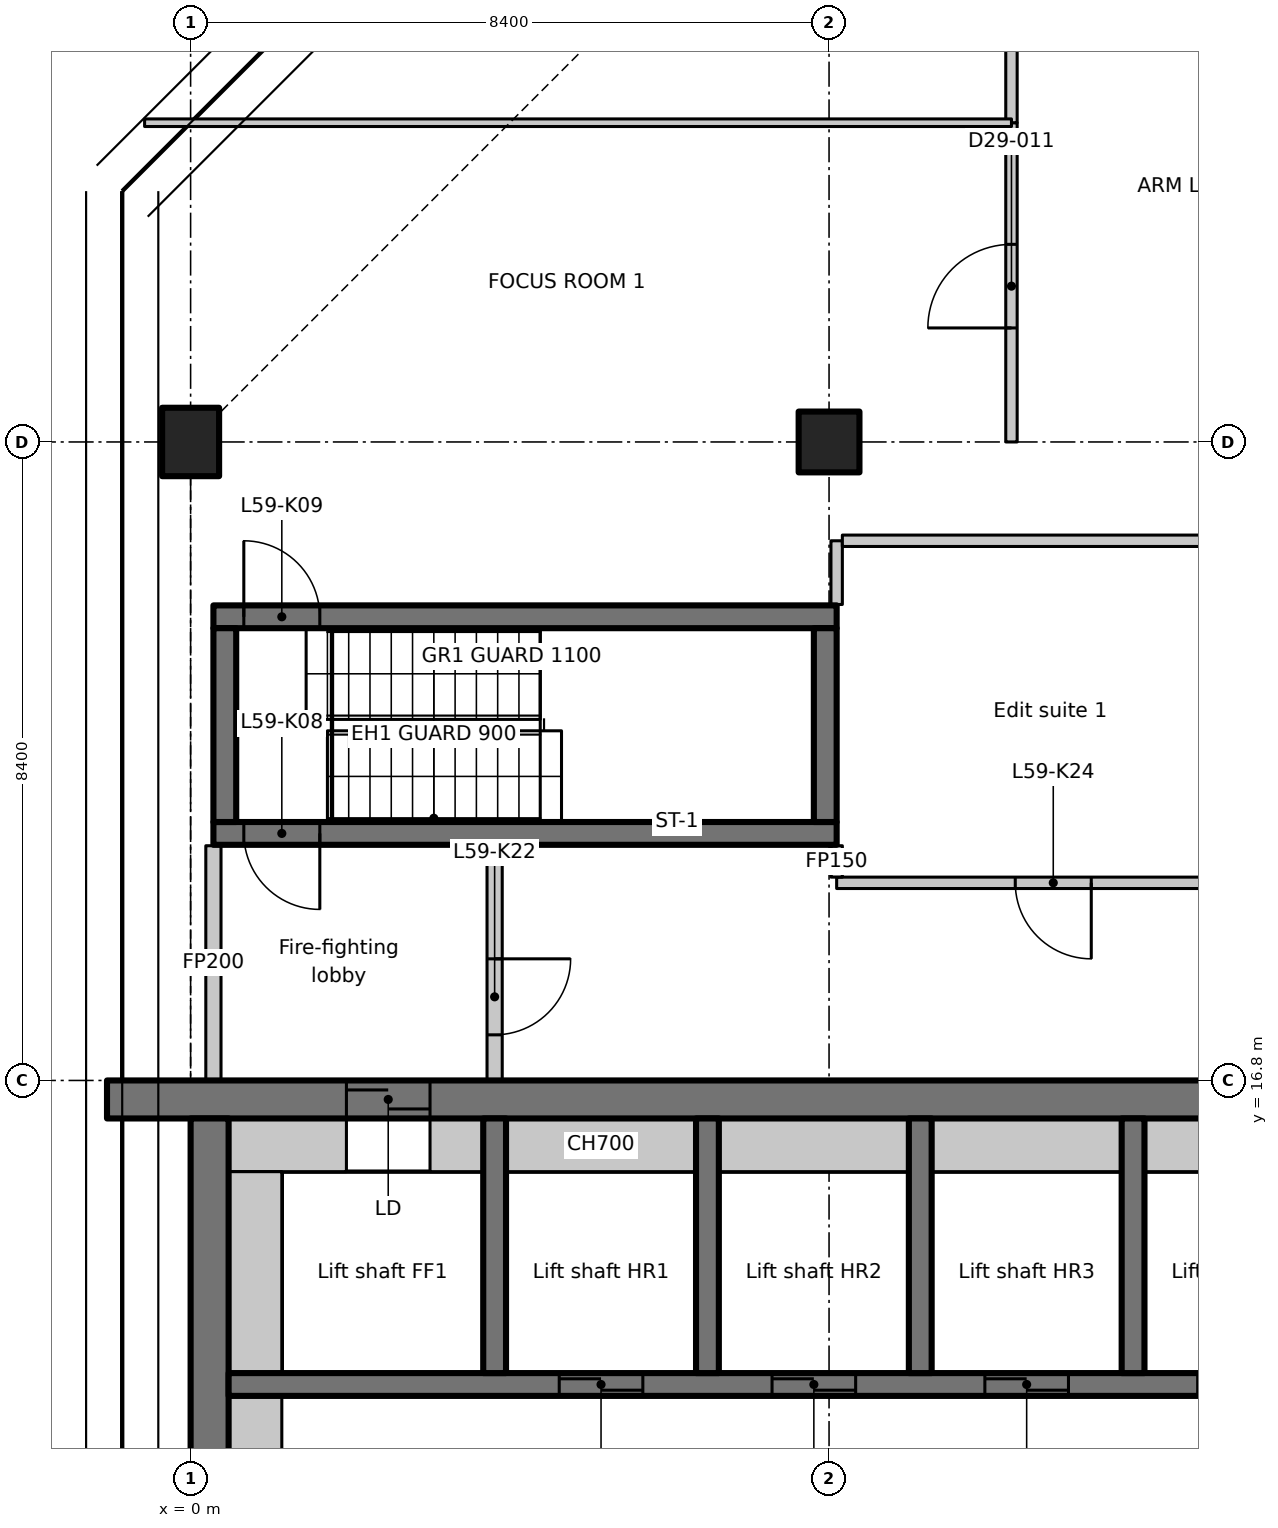
"""IFC4 building model, lengths in metres.
Left out: names, types, materials, properties, quantities, classifications, styles, units other than length and angle.
Written with IfcOpenShell. Run it as: python <this file> out.ifc"""

import sys

from ifc_helpers import new_model, si_unit, direction, frame, frame_2d, origin, origin_2d, place, context, subcontext, project, spatial, polyline, rectangle, outline, extrude, element, fill, save


model = new_model("IFC4")
c1 = context("Model", 3, precision=1e-05, world=origin(), true_north=direction((0.0, 1.0)))
c2 = subcontext(c1, "Body", "Model", "MODEL_VIEW")
j1 = project(units=[si_unit("LENGTHUNIT", "METRE"), si_unit("PLANEANGLEUNIT", "RADIAN")], contexts=[c1])
p1 = place(None, origin())
s1 = spatial("IfcSite", under=j1, at=p1, CompositionType="ELEMENT")
p2 = place(p1, origin())
s2 = spatial("IfcBuilding", under=s1, at=p2, CompositionType="ELEMENT")
p3 = place(p2, frame((0.0, 0.0, 233.7)))
s3 = spatial("IfcBuildingStorey", under=s2, at=p3, CompositionType="ELEMENT", Elevation=233.7)
p4 = place(p3, frame((0.0, 25.2, 0.0), z_axis=(0.0, 0.0, 1.0), x_axis=(1.0, 0.0, 0.0)))
e1 = element("IfcColumn", 1, at=p4, inside=s3, PredefinedType="COLUMN", context=c2, shape_type="SweptSolid", body=[
    extrude(rectangle(XDim=0.75, YDim=0.9, at=origin_2d()), origin(), (0.0, 0.0, 1.0), 3.35),
])
p5 = place(p3, frame((8.4, 25.2, 0.0), z_axis=(0.0, 0.0, 1.0), x_axis=(1.0, 0.0, 0.0)))
e2 = element("IfcColumn", 2, at=p5, inside=s3, PredefinedType="COLUMN", context=c2, shape_type="SweptSolid", body=[
    extrude(rectangle(XDim=0.8, YDim=0.8, at=origin_2d()), origin(), (0.0, 0.0, 1.0), 3.35),
])
p6 = place(p3, frame((-1.1, 16.55, 0.0), z_axis=(0.0, 0.0, 1.0), x_axis=(1.0, 0.0, 0.0)))
e3 = element("IfcWall", 3, at=p6, inside=s3, PredefinedType="SHEAR", context=c2, shape_type="SweptSolid", body=[
    extrude(rectangle(XDim=22.1, YDim=0.5, at=frame_2d((11.05, 0.0))), origin(), (0.0, 0.0, 1.0), 3.35),
])
p7 = place(p6, frame((3.15, 0.0, 0.0)))
e4 = element("IfcOpeningElement", 4, at=p7, cuts=e3, PredefinedType="OPENING", context=c2, shape_type="SweptSolid", body=[
    extrude(rectangle(XDim=1.1, YDim=2.3, at=frame_2d((0.55, 1.15))), frame((0.0, 0.26, 0.0), z_axis=(0.0, -1.0, 0.0), x_axis=(1.0, 0.0, 0.0)), (0.0, 0.0, 1.0), 0.52),
])
p8 = place(p3, frame((0.25, 7.436, 0.0), z_axis=(0.0, 0.0, 1.0), x_axis=(0.0, 1.0, 0.0)))
e5 = element("IfcWall", 5, at=p8, inside=s3, PredefinedType="SHEAR", context=c2, shape_type="SweptSolid", body=[
    extrude(rectangle(XDim=8.864, YDim=0.5, at=frame_2d((4.432, 0.0))), origin(), (0.0, 0.0, 1.0), 3.35),
])
p9 = place(p3, frame((0.5, 15.95, 0.0), z_axis=(0.0, 0.0, 1.0), x_axis=(1.0, 0.0, 0.0)))
e6 = element("IfcWall", 6, at=p9, inside=s3, PredefinedType="PARTITIONING", context=c2, shape_type="SweptSolid", body=[
    extrude(rectangle(XDim=1.55, YDim=0.7, at=frame_2d((0.775, 0.0))), origin(), (0.0, 0.0, 1.0), 3.35),
])
p10 = place(p3, frame((0.5, 12.8, 0.0), z_axis=(0.0, 0.0, 1.0), x_axis=(1.0, 0.0, 0.0)))
e7 = element("IfcWall", 7, at=p10, inside=s3, PredefinedType="SHEAR", context=c2, shape_type="SweptSolid", body=[
    extrude(rectangle(XDim=14.85, YDim=0.3, at=frame_2d((7.425, 0.0))), origin(), (0.0, 0.0, 1.0), 3.35),
])
p11 = place(p10, frame((4.35, 0.0, 0.0)))
e8 = element("IfcOpeningElement", 8, at=p11, cuts=e7, PredefinedType="OPENING", context=c2, shape_type="SweptSolid", body=[
    extrude(rectangle(XDim=1.1, YDim=2.3, at=frame_2d((0.55, 1.15))), frame((0.0, 0.16, 0.0), z_axis=(0.0, -1.0, 0.0), x_axis=(1.0, 0.0, 0.0)), (0.0, 0.0, 1.0), 0.32),
])
p12 = place(p10, frame((7.15, 0.0, 0.0)))
e9 = element("IfcOpeningElement", 9, at=p12, cuts=e7, PredefinedType="OPENING", context=c2, shape_type="SweptSolid", body=[
    extrude(rectangle(XDim=1.1, YDim=2.3, at=frame_2d((0.55, 1.15))), frame((0.0, 0.16, 0.0), z_axis=(0.0, -1.0, 0.0), x_axis=(1.0, 0.0, 0.0)), (0.0, 0.0, 1.0), 0.32),
])
p13 = place(p10, frame((9.95, 0.0, 0.0)))
e10 = element("IfcOpeningElement", 10, at=p13, cuts=e7, PredefinedType="OPENING", context=c2, shape_type="SweptSolid", body=[
    extrude(rectangle(XDim=1.1, YDim=2.3, at=frame_2d((0.55, 1.15))), frame((0.0, 0.16, 0.0), z_axis=(0.0, -1.0, 0.0), x_axis=(1.0, 0.0, 0.0)), (0.0, 0.0, 1.0), 0.32),
])
p14 = place(p10, frame((12.75, 0.0, 0.0)))
e11 = element("IfcOpeningElement", 11, at=p14, cuts=e7, PredefinedType="OPENING", context=c2, shape_type="SweptSolid", body=[
    extrude(rectangle(XDim=1.1, YDim=2.3, at=frame_2d((0.55, 1.15))), frame((0.0, 0.16, 0.0), z_axis=(0.0, -1.0, 0.0), x_axis=(1.0, 0.0, 0.0)), (0.0, 0.0, 1.0), 0.32),
])
for number, where, z_axis, x_axis in (
    (12, (4.0, 12.95, 0.0), (0.0, 0.0, 1.0), (0.0, 1.0, 0.0)),
    (13, (6.8, 12.95, 0.0), (0.0, 0.0, 1.0), (0.0, 1.0, 0.0)),
    (14, (9.6, 12.95, 0.0), (0.0, 0.0, 1.0), (0.0, 1.0, 0.0)),
    (15, (12.4, 12.95, 0.0), (0.0, 0.0, 1.0), (0.0, 1.0, 0.0)),
):
    element("IfcWall", number, at=place(p3, frame(where, z_axis=z_axis, x_axis=x_axis)), inside=s3, PredefinedType="SHEAR", context=c2, shape_type="SweptSolid", body=[
        extrude(rectangle(XDim=3.35, YDim=0.3, at=frame_2d((1.675, 0.0))), origin(), (0.0, 0.0, 1.0), 3.35),
    ])
p15 = place(p3, frame((8.5, 20.05, 0.0), z_axis=(0.0, 0.0, 1.0), x_axis=(-1.0, 0.0, 0.0)))
e16 = element("IfcWall", 16, at=p15, inside=s3, PredefinedType="SHEAR", context=c2, shape_type="SweptSolid", body=[
    extrude(rectangle(XDim=8.2, YDim=0.3, at=frame_2d((4.1, 0.0))), origin(), (0.0, 0.0, 1.0), 3.35),
])
p16 = place(p15, frame((6.8, 0.0, 0.0)))
e17 = element("IfcOpeningElement", 17, at=p16, cuts=e16, PredefinedType="OPENING", context=c2, shape_type="SweptSolid", body=[
    extrude(rectangle(XDim=1.0, YDim=2.1, at=frame_2d((0.5, 1.05))), frame((0.0, 0.16, 0.0), z_axis=(0.0, -1.0, 0.0), x_axis=(1.0, 0.0, 0.0)), (0.0, 0.0, 1.0), 0.32),
])
p17 = place(p3, frame((0.3, 22.9, 0.0), z_axis=(0.0, 0.0, 1.0), x_axis=(1.0, 0.0, 0.0)))
e18 = element("IfcWall", 18, at=p17, inside=s3, PredefinedType="SHEAR", context=c2, shape_type="SweptSolid", body=[
    extrude(rectangle(XDim=8.2, YDim=0.3, at=frame_2d((4.1, 0.0))), origin(), (0.0, 0.0, 1.0), 3.35),
])
p18 = place(p17, frame((0.4, 0.0, 0.0)))
e19 = element("IfcOpeningElement", 19, at=p18, cuts=e18, PredefinedType="OPENING", context=c2, shape_type="SweptSolid", body=[
    extrude(rectangle(XDim=1.0, YDim=2.1, at=frame_2d((0.5, 1.05))), frame((0.0, 0.16, 0.0), z_axis=(0.0, -1.0, 0.0), x_axis=(1.0, 0.0, 0.0)), (0.0, 0.0, 1.0), 0.32),
])
for number, where, z_axis, x_axis in (
    (20, (0.45, 20.2, 0.0), (0.0, 0.0, 1.0), (0.0, 1.0, 0.0)),
    (21, (8.35, 20.2, 0.0), (0.0, 0.0, 1.0), (0.0, 1.0, 0.0)),
):
    element("IfcWall", number, at=place(p3, frame(where, z_axis=z_axis, x_axis=x_axis)), inside=s3, PredefinedType="SHEAR", context=c2, shape_type="SweptSolid", body=[
        extrude(rectangle(XDim=2.55, YDim=0.3, at=frame_2d((1.275, 0.0))), origin(), (0.0, 0.0, 1.0), 3.35),
    ])
p19 = place(p3, frame((0.3, 16.812, 0.0), z_axis=(0.0, 0.0, 1.0), x_axis=(0.0, 1.0, 0.0)))
e22 = element("IfcWall", 22, at=p19, inside=s3, PredefinedType="PARTITIONING", context=c2, shape_type="SweptSolid", body=[
    extrude(rectangle(XDim=3.076, YDim=0.2, at=frame_2d((1.538, 0.0))), origin(), (0.0, 0.0, 1.0), 2.98),
])
p20 = place(p3, frame((4.0, 19.888, 0.0), z_axis=(0.0, 0.0, 1.0), x_axis=(0.0, -1.0, 0.0)))
e23 = element("IfcWall", 23, at=p20, inside=s3, PredefinedType="PARTITIONING", context=c2, shape_type="SweptSolid", body=[
    extrude(rectangle(XDim=3.076, YDim=0.2, at=frame_2d((1.538, 0.0))), origin(), (0.0, 0.0, 1.0), 3.35),
])
p21 = place(p20, frame((1.488, 0.0, 0.0)))
e24 = element("IfcOpeningElement", 24, at=p21, cuts=e23, PredefinedType="OPENING", context=c2, shape_type="SweptSolid", body=[
    extrude(rectangle(XDim=1.0, YDim=2.1, at=frame_2d((0.5, 1.05))), frame((0.0, 0.11, 0.0), z_axis=(0.0, -1.0, 0.0), x_axis=(1.0, 0.0, 0.0)), (0.0, 0.0, 1.0), 0.22),
])
p22 = place(p3, frame((14.2, 19.4, 0.0), z_axis=(0.0, 0.0, 1.0), x_axis=(-1.0, 0.0, 0.0)))
e25 = element("IfcWall", 25, at=p22, inside=s3, PredefinedType="PARTITIONING", context=c2, shape_type="SweptSolid", body=[
    extrude(rectangle(XDim=5.7, YDim=0.15, at=frame_2d((2.85, 0.0))), origin(), (0.0, 0.0, 1.0), 3.35),
])
p23 = place(p22, frame((2.35, 0.0, 0.0)))
e26 = element("IfcOpeningElement", 26, at=p23, cuts=e25, PredefinedType="OPENING", context=c2, shape_type="SweptSolid", body=[
    extrude(rectangle(XDim=1.0, YDim=2.1, at=frame_2d((0.5, 1.05))), frame((0.0, 0.085, 0.0), z_axis=(0.0, -1.0, 0.0), x_axis=(1.0, 0.0, 0.0)), (0.0, 0.0, 1.0), 0.17),
])
p24 = place(p3, frame((8.5, 19.475, 0.0), z_axis=(0.0, 0.0, 1.0), x_axis=(0.0, 1.0, 0.0)))
e27 = element("IfcWall", 27, at=p24, inside=s3, PredefinedType="PARTITIONING", context=c2, shape_type="SweptSolid", body=[
    extrude(rectangle(XDim=0.413, YDim=0.15, at=frame_2d((0.207, 0.0))), origin(), (0.0, 0.0, 1.0), 3.35),
])
p25 = place(p3, frame((8.5, 23.062, 0.0), z_axis=(0.0, 0.0, 1.0), x_axis=(0.0, 1.0, 0.0)))
e28 = element("IfcWall", 28, at=p25, inside=s3, PredefinedType="PARTITIONING", context=c2, shape_type="SweptSolid", body=[
    extrude(rectangle(XDim=0.838, YDim=0.15, at=frame_2d((0.419, 0.0))), origin(), (0.0, 0.0, 1.0), 3.35),
])
p26 = place(p3, frame((8.575, 23.9, 0.0), z_axis=(0.0, 0.0, 1.0), x_axis=(1.0, 0.0, 0.0)))
e29 = element("IfcWall", 29, at=p26, inside=s3, PredefinedType="PARTITIONING", context=c2, shape_type="SweptSolid", body=[
    extrude(rectangle(XDim=5.625, YDim=0.15, at=frame_2d((2.812, 0.0))), origin(), (0.0, 0.0, 1.0), 3.35),
])
p27 = place(p3, frame((0.85, 7.436, 0.0), z_axis=(0.0, 0.0, 1.0), x_axis=(0.0, 1.0, 0.0)))
e30 = element("IfcWall", 30, at=p27, inside=s3, PredefinedType="PARTITIONING", context=c2, shape_type="SweptSolid", body=[
    extrude(rectangle(XDim=5.214, YDim=0.7, at=frame_2d((2.607, 0.0))), origin(), (0.0, 0.0, 1.0), 3.35),
])
p28 = place(p3, frame((0.85, 12.95, 0.0), z_axis=(0.0, 0.0, 1.0), x_axis=(0.0, 1.0, 0.0)))
e31 = element("IfcWall", 31, at=p28, inside=s3, PredefinedType="PARTITIONING", context=c2, shape_type="SweptSolid", body=[
    extrude(rectangle(XDim=2.65, YDim=0.7, at=frame_2d((1.325, 0.0))), origin(), (0.0, 0.0, 1.0), 3.35),
])
p29 = place(p3, frame((3.15, 15.95, 0.0), z_axis=(0.0, 0.0, 1.0), x_axis=(1.0, 0.0, 0.0)))
e32 = element("IfcWall", 32, at=p29, inside=s3, PredefinedType="PARTITIONING", context=c2, shape_type="SweptSolid", body=[
    extrude(rectangle(XDim=0.7, YDim=0.7, at=frame_2d((0.35, 0.0))), origin(), (0.0, 0.0, 1.0), 3.35),
])
for number, where, z_axis, x_axis in (
    (33, (4.15, 15.95, 0.0), (0.0, 0.0, 1.0), (1.0, 0.0, 0.0)),
    (34, (6.95, 15.95, 0.0), (0.0, 0.0, 1.0), (1.0, 0.0, 0.0)),
    (35, (9.75, 15.95, 0.0), (0.0, 0.0, 1.0), (1.0, 0.0, 0.0)),
    (36, (12.55, 15.95, 0.0), (0.0, 0.0, 1.0), (1.0, 0.0, 0.0)),
):
    element("IfcWall", number, at=place(p3, frame(where, z_axis=z_axis, x_axis=x_axis)), inside=s3, PredefinedType="PARTITIONING", context=c2, shape_type="SweptSolid", body=[
        extrude(rectangle(XDim=2.5, YDim=0.7, at=frame_2d((1.25, 0.0))), origin(), (0.0, 0.0, 1.0), 3.35),
    ])
p30 = place(p3, frame((10.8, 25.2, 0.0), z_axis=(0.0, 0.0, 1.0), x_axis=(0.0, 1.0, 0.0)))
e37 = element("IfcWall", 37, at=p30, inside=s3, PredefinedType="PARTITIONING", context=c2, shape_type="SweptSolid", body=[
    extrude(rectangle(XDim=4.2, YDim=0.15, at=frame_2d((2.1, 0.0))), origin(), (0.0, 0.0, 1.0), 3.33),
])
p31 = place(p30, frame((1.5, 0.0, 0.0)))
e38 = element("IfcOpeningElement", 38, at=p31, cuts=e37, PredefinedType="OPENING", context=c2, shape_type="SweptSolid", body=[
    extrude(rectangle(XDim=1.1, YDim=2.1, at=frame_2d((0.55, 1.05))), frame((0.0, 0.085, 0.0), z_axis=(0.0, -1.0, 0.0), x_axis=(1.0, 0.0, 0.0)), (0.0, 0.0, 1.0), 0.17),
])
p32 = place(p3, frame((10.8, 29.4, 0.0), z_axis=(0.0, 0.0, 1.0), x_axis=(0.0, 1.0, 0.0)))
e39 = element("IfcWall", 39, at=p32, inside=s3, PredefinedType="PARTITIONING", context=c2, shape_type="SweptSolid", body=[
    extrude(rectangle(XDim=4.2, YDim=0.15, at=frame_2d((2.1, 0.0))), origin(), (0.0, 0.0, 1.0), 2.98),
])
p33 = place(p32, frame((1.5, 0.0, 0.0)))
e40 = element("IfcOpeningElement", 40, at=p33, cuts=e39, PredefinedType="OPENING", context=c2, shape_type="SweptSolid", body=[
    extrude(rectangle(XDim=1.1, YDim=2.1, at=frame_2d((0.55, 1.05))), frame((0.0, 0.085, 0.0), z_axis=(0.0, -1.0, 0.0), x_axis=(1.0, 0.0, 0.0)), (0.0, 0.0, 1.0), 0.17),
])
p34 = place(p3, frame((-0.605, 29.4, 0.0), z_axis=(0.0, 0.0, 1.0), x_axis=(1.0, 0.0, 0.0)))
e41 = element("IfcWall", 41, at=p34, inside=s3, PredefinedType="PARTITIONING", context=c2, shape_type="SweptSolid", body=[
    extrude(outline(polyline([(0.0, 0.0), (11.406, 0.0), (11.406, 3.33), (5.471, 3.33), (5.469, 2.98), (4.142, 2.98), (4.14, 3.33), (0.406, 3.33), (0.0, 3.33), (0.0, 0.0)])), frame((0.0, 0.05, 0.0), z_axis=(0.0, -1.0, 0.0), x_axis=(1.0, 0.0, 0.0)), (0.0, 0.0, 1.0), 0.1),
])
p35 = place(p7, origin())
e42 = element("IfcDoor", 42, at=p35, inside=s3, OperationType="SLIDING_TO_LEFT", PredefinedType="DOOR", context=c2, shape_type="SweptSolid", body=[
    extrude(rectangle(XDim=1.1, YDim=2.3, at=frame_2d((0.55, 1.15))), frame((0.0, 0.025, 0.0), z_axis=(0.0, -1.0, 0.0), x_axis=(1.0, 0.0, 0.0)), (0.0, 0.0, 1.0), 0.05),
])
fill(e4, e42)
p36 = place(p11, origin())
e43 = element("IfcDoor", 43, at=p36, inside=s3, OperationType="SLIDING_TO_LEFT", PredefinedType="DOOR", context=c2, shape_type="SweptSolid", body=[
    extrude(rectangle(XDim=1.1, YDim=2.3, at=frame_2d((0.55, 1.15))), frame((0.0, 0.025, 0.0), z_axis=(0.0, -1.0, 0.0), x_axis=(1.0, 0.0, 0.0)), (0.0, 0.0, 1.0), 0.05),
])
fill(e8, e43)
p37 = place(p12, origin())
e44 = element("IfcDoor", 44, at=p37, inside=s3, OperationType="SLIDING_TO_LEFT", PredefinedType="DOOR", context=c2, shape_type="SweptSolid", body=[
    extrude(rectangle(XDim=1.1, YDim=2.3, at=frame_2d((0.55, 1.15))), frame((0.0, 0.025, 0.0), z_axis=(0.0, -1.0, 0.0), x_axis=(1.0, 0.0, 0.0)), (0.0, 0.0, 1.0), 0.05),
])
fill(e9, e44)
p38 = place(p13, origin())
e45 = element("IfcDoor", 45, at=p38, inside=s3, OperationType="SLIDING_TO_LEFT", PredefinedType="DOOR", context=c2, shape_type="SweptSolid", body=[
    extrude(rectangle(XDim=1.1, YDim=2.3, at=frame_2d((0.55, 1.15))), frame((0.0, 0.025, 0.0), z_axis=(0.0, -1.0, 0.0), x_axis=(1.0, 0.0, 0.0)), (0.0, 0.0, 1.0), 0.05),
])
fill(e10, e45)
p39 = place(p16, origin())
e46 = element("IfcDoor", 46, at=p39, inside=s3, OperationType="SINGLE_SWING_LEFT", PredefinedType="DOOR", context=c2, shape_type="SweptSolid", body=[
    extrude(rectangle(XDim=1.0, YDim=2.1, at=frame_2d((0.5, 1.05))), frame((0.0, 0.025, 0.0), z_axis=(0.0, -1.0, 0.0), x_axis=(1.0, 0.0, 0.0)), (0.0, 0.0, 1.0), 0.05),
])
fill(e17, e46)
p40 = place(p18, origin())
e47 = element("IfcDoor", 47, at=p40, inside=s3, OperationType="SINGLE_SWING_RIGHT", PredefinedType="DOOR", context=c2, shape_type="SweptSolid", body=[
    extrude(rectangle(XDim=1.0, YDim=2.1, at=frame_2d((0.5, 1.05))), frame((0.0, 0.025, 0.0), z_axis=(0.0, -1.0, 0.0), x_axis=(1.0, 0.0, 0.0)), (0.0, 0.0, 1.0), 0.05),
])
fill(e19, e47)
p41 = place(p21, origin())
e48 = element("IfcDoor", 48, at=p41, inside=s3, OperationType="SINGLE_SWING_LEFT", PredefinedType="DOOR", context=c2, shape_type="SweptSolid", body=[
    extrude(rectangle(XDim=1.0, YDim=2.1, at=frame_2d((0.5, 1.05))), frame((0.0, 0.025, 0.0), z_axis=(0.0, -1.0, 0.0), x_axis=(1.0, 0.0, 0.0)), (0.0, 0.0, 1.0), 0.05),
])
fill(e24, e48)
p42 = place(p23, origin())
e49 = element("IfcDoor", 49, at=p42, inside=s3, OperationType="SINGLE_SWING_LEFT", PredefinedType="DOOR", context=c2, shape_type="SweptSolid", body=[
    extrude(rectangle(XDim=1.0, YDim=2.1, at=frame_2d((0.5, 1.05))), frame((0.0, 0.025, 0.0), z_axis=(0.0, -1.0, 0.0), x_axis=(1.0, 0.0, 0.0)), (0.0, 0.0, 1.0), 0.05),
])
fill(e26, e49)
p43 = place(p31, origin())
e50 = element("IfcDoor", 50, at=p43, inside=s3, OperationType="SINGLE_SWING_LEFT", PredefinedType="DOOR", context=c2, shape_type="SweptSolid", body=[
    extrude(rectangle(XDim=1.1, YDim=2.1, at=frame_2d((0.55, 1.05))), frame((0.0, 0.025, 0.0), z_axis=(0.0, -1.0, 0.0), x_axis=(1.0, 0.0, 0.0)), (0.0, 0.0, 1.0), 0.05),
])
fill(e38, e50)
save(model, sys.argv[1])
